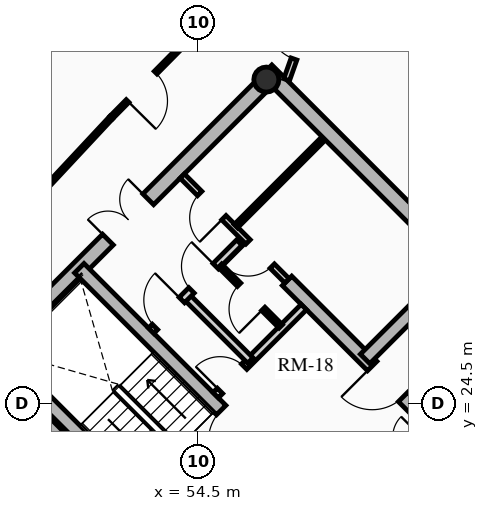
"""IFC4 building model, lengths in metres.
Left out: names, types, materials, properties, quantities, classifications, styles, units other than length and angle.
Written with IfcOpenShell. Run it as: python <this file> out.ifc"""

import sys

from ifc_helpers import new_model, si_unit, direction, frame, frame_2d, origin, origin_2d, place, context, subcontext, project, spatial, rectangle, hollow_circle, extrude, source, transform, mapped, element, fill, save


model = new_model("IFC4")
c1 = context("Model", 3, precision=1e-05, world=origin(), true_north=direction((0.0, 1.0)))
c2 = subcontext(c1, "Body", "Model", "MODEL_VIEW")
j1 = project(units=[si_unit("LENGTHUNIT", "METRE"), si_unit("PLANEANGLEUNIT", "RADIAN")], contexts=[c1])
p1 = place(None, origin())
s1 = spatial("IfcSite", under=j1, at=p1, CompositionType="ELEMENT")
p2 = place(p1, origin())
s2 = spatial("IfcBuilding", under=s1, at=p2, CompositionType="ELEMENT")
p3 = place(p2, frame((0.0, 0.0, 202.48)))
s3 = spatial("IfcBuildingStorey", under=s2, at=p3, CompositionType="ELEMENT", Elevation=202.48)
for number, where, z_axis, x_axis in (
    (1, (58.702, 15.732, 0.0), (0.0, 0.0, 1.0), (-0.707, 0.707, 0.0)),
    (2, (66.268, 23.298, 0.0), (0.0, 0.0, 1.0), (-0.707, 0.707, 0.0)),
):
    element("IfcWall", number, at=place(p3, frame(where, z_axis=z_axis, x_axis=x_axis)), inside=s3, PredefinedType="SHEAR", context=c2, shape_type="SweptSolid", body=[
        extrude(rectangle(XDim=14.1, YDim=0.4, at=frame_2d((7.05, 0.0))), origin(), (0.0, 0.0, 1.0), 2.91),
    ])
p4 = place(p3, frame((48.873, 25.561, 0.0), z_axis=(0.0, 0.0, 1.0), x_axis=(0.707106781187, 0.707106781187, 0.0)))
e3 = element("IfcWall", 3, at=p4, inside=s3, PredefinedType="SHEAR", context=c2, shape_type="SweptSolid", body=[
    extrude(rectangle(XDim=10.7, YDim=0.4, at=frame_2d((5.35, 0.0))), origin(), (0.0, 0.0, 1.0), 2.91),
])
m1 = source(origin(), c2, "Body", "SweptSolid", [
    extrude(rectangle(XDim=1.5, YDim=2.02, at=frame_2d((0.75, 1.01))), frame((0.0, 0.21, 0.0), z_axis=(0.0, -1.0, 0.0), x_axis=(1.0, 0.0, 0.0)), (0.0, 0.0, 1.0), 0.42),
])
p5 = place(p4, frame((4.6, 0.0, 0.0)))
e4 = element("IfcOpeningElement", 4, at=p5, cuts=e3, PredefinedType="OPENING", context=c2, shape_type="MappedRepresentation", body=[
    mapped(m1, transform((0.0, 0.0, 0.0), x_axis=(1.0, 0.0, 0.0), y_axis=(0.0, 1.0, 0.0), z_axis=(0.0, 0.0, 1.0), scale=1.0)),
])
p6 = place(p3, frame((61.06, 18.373, 0.0), z_axis=(0.0, 0.0, 1.0), x_axis=(-0.707106781187, 0.707106781187, 0.0)))
e5 = element("IfcWall", 5, at=p6, inside=s3, PredefinedType="SHEAR", context=c2, shape_type="SweptSolid", body=[
    extrude(rectangle(XDim=13.7, YDim=0.35, at=frame_2d((6.85, 0.0))), origin(), (0.0, 0.0, 1.0), 2.91),
])
m2 = source(origin(), c2, "Body", "SweptSolid", [
    extrude(rectangle(XDim=1.1, YDim=2.015, at=frame_2d((0.55, 1.007))), frame((0.0, 0.185, 0.0), z_axis=(0.0, -1.0, 0.0), x_axis=(1.0, 0.0, 0.0)), (0.0, 0.0, 1.0), 0.37),
])
p7 = place(p6, frame((4.85, 0.0, 0.0)))
e6 = element("IfcOpeningElement", 6, at=p7, cuts=e5, PredefinedType="OPENING", context=c2, shape_type="MappedRepresentation", body=[
    mapped(m2, transform((0.0, 0.0, 0.0), x_axis=(1.0, 0.0, 0.0), y_axis=(0.0, 1.0, 0.0), z_axis=(0.0, 0.0, 1.0), scale=1.0)),
])
p8 = place(p6, frame((0.625, 0.0, 0.0)))
e7 = element("IfcOpeningElement", 7, at=p8, cuts=e5, PredefinedType="OPENING", context=c2, shape_type="MappedRepresentation", body=[
    mapped(m2, transform((0.0, 0.0, 0.0), x_axis=(1.0, 0.0, 0.0), y_axis=(0.0, 1.0, 0.0), z_axis=(0.0, 0.0, 1.0), scale=1.0)),
])
p9 = place(p6, frame((2.625, 0.0, 0.0)))
e8 = element("IfcOpeningElement", 8, at=p9, cuts=e5, PredefinedType="OPENING", context=c2, shape_type="MappedRepresentation", body=[
    mapped(m2, transform((0.0, 0.0, 0.0), x_axis=(1.0, 0.0, 0.0), y_axis=(0.0, 1.0, 0.0), z_axis=(0.0, 0.0, 1.0), scale=1.0)),
])
m3 = source(origin(), c2, "Body", "SweptSolid", [
    extrude(rectangle(XDim=1.15, YDim=2.02, at=frame_2d((0.575, 1.01))), frame((0.0, 0.185, 0.0), z_axis=(0.0, -1.0, 0.0), x_axis=(1.0, 0.0, 0.0)), (0.0, 0.0, 1.0), 0.37),
])
p10 = place(p6, frame((7.27, 0.0, 0.0)))
e9 = element("IfcOpeningElement", 9, at=p10, cuts=e5, PredefinedType="OPENING", context=c2, shape_type="MappedRepresentation", body=[
    mapped(m3, transform((0.0, 0.0, 0.0), x_axis=(1.0, 0.0, 0.0), y_axis=(0.0, 1.0, 0.0), z_axis=(0.0, 0.0, 1.0), scale=1.0)),
])
p11 = place(p3, frame((63.627, 20.94, 0.0), z_axis=(0.0, 0.0, 1.0), x_axis=(-0.707119496762, 0.707094065383, 0.0)))
e10 = element("IfcWall", 10, at=p11, inside=s3, PredefinedType="SHEAR", context=c2, shape_type="SweptSolid", body=[
    extrude(rectangle(XDim=9.6, YDim=0.35, at=frame_2d((4.8, 0.0))), origin(), (0.0, 0.0, 1.0), 2.91),
])
p12 = place(p11, frame((5.28, 0.0, 0.0)))
e11 = element("IfcOpeningElement", 11, at=p12, cuts=e10, PredefinedType="OPENING", context=c2, shape_type="MappedRepresentation", body=[
    mapped(m3, transform((0.0, 0.0, 0.0), x_axis=(1.0, 0.0, 0.0), y_axis=(0.0, 1.0, 0.0), z_axis=(0.0, 0.0, 1.0), scale=1.0)),
])
p13 = place(p3, frame((53.922, 21.141, 0.0), z_axis=(0.0, 0.0, 1.0), x_axis=(-0.707106781187, 0.707106781187, 0.0)))
e12 = element("IfcWall", 12, at=p13, inside=s3, PredefinedType="SHEAR", context=c2, shape_type="SweptSolid", body=[
    extrude(rectangle(XDim=6.695, YDim=0.35, at=frame_2d((3.348, 0.0))), origin(), (0.0, 0.0, 1.0), 2.91),
])
p14 = place(p3, frame((58.893, 25.674, 0.0), z_axis=(0.0, 0.0, 1.0), x_axis=(0.707106781187, 0.707106781187, 0.0)))
e13 = element("IfcWall", 13, at=p14, inside=s3, PredefinedType="SHEAR", context=c2, shape_type="SweptSolid", body=[
    extrude(rectangle(XDim=3.285, YDim=0.35, at=frame_2d((1.643, 0.0))), origin(), (0.0, 0.0, 1.0), 2.91),
])
p15 = place(p3, frame((56.294, 33.024, 0.0), z_axis=(0.0, 0.0, 1.0), x_axis=(0.707106781187, 0.707106781187, 0.0)))
e14 = element("IfcColumn", 14, at=p15, inside=s3, PredefinedType="COLUMN", context=c2, shape_type="SweptSolid", body=[
    extrude(hollow_circle(Radius=0.33, WallThickness=0.025, at=origin_2d()), origin(), (0.0, 0.0, 1.0), 2.91),
])
p16 = place(p3, frame((58.214, 21.467, 0.0), z_axis=(0.0, 0.0, 1.0), x_axis=(0.707106781187, 0.707106781187, 0.0)))
e15 = element("IfcWall", 15, at=p16, inside=s3, PredefinedType="PARTITIONING", context=c2, shape_type="SweptSolid", body=[
    extrude(rectangle(XDim=3.28, YDim=0.2, at=frame_2d((1.64, 0.0))), origin(), (0.0, 0.0, 1.0), 2.685),
])
m4 = source(origin(), c2, "Body", "SweptSolid", [
    extrude(rectangle(XDim=1.5, YDim=2.02, at=frame_2d((0.75, 1.01))), frame((0.0, 0.11, 0.0), z_axis=(0.0, -1.0, 0.0), x_axis=(1.0, 0.0, 0.0)), (0.0, 0.0, 1.0), 0.22),
])
p17 = place(p16, frame((1.55, 0.0, 0.0)))
e16 = element("IfcOpeningElement", 16, at=p17, cuts=e15, PredefinedType="OPENING", context=c2, shape_type="MappedRepresentation", body=[
    mapped(m4, transform((0.0, 0.0, 0.0), x_axis=(1.0, 0.0, 0.0), y_axis=(0.0, 1.0, 0.0), z_axis=(0.0, 0.0, 1.0), scale=1.0)),
])
p18 = place(p3, frame((54.961, 24.719, 0.0), z_axis=(0.0, 0.0, 1.0), x_axis=(0.707106781187, 0.707106781187, 0.0)))
e17 = element("IfcWall", 17, at=p18, inside=s3, PredefinedType="PARTITIONING", context=c2, shape_type="SweptSolid", body=[
    extrude(rectangle(XDim=3.28, YDim=0.2, at=frame_2d((1.64, 0.0))), origin(), (0.0, 0.0, 1.0), 2.685),
])
m5 = source(origin(), c2, "Body", "SweptSolid", [
    extrude(rectangle(XDim=0.9, YDim=2.005, at=frame_2d((0.45, 1.002))), frame((0.0, 0.11, 0.0), z_axis=(0.0, -1.0, 0.0), x_axis=(1.0, 0.0, 0.0)), (0.0, 0.0, 1.0), 0.22),
])
p19 = place(p18, frame((0.16, 0.0, 0.0)))
e18 = element("IfcOpeningElement", 18, at=p19, cuts=e17, PredefinedType="OPENING", context=c2, shape_type="MappedRepresentation", body=[
    mapped(m5, transform((0.0, 0.0, 0.0), x_axis=(1.0, 0.0, 0.0), y_axis=(0.0, 1.0, 0.0), z_axis=(0.0, 0.0, 1.0), scale=1.0)),
])
p20 = place(p3, frame((55.874, 25.631, 0.0), z_axis=(0.0, 0.0, 1.0), x_axis=(-0.707157639372, 0.707055919343, 0.0)))
e19 = element("IfcWall", 19, at=p20, inside=s3, PredefinedType="PARTITIONING", context=c2, shape_type="SweptSolid", body=[
    extrude(rectangle(XDim=2.4, YDim=0.2, at=frame_2d((1.2, 0.0))), origin(), (0.0, 0.0, 1.0), 2.685),
])
p21 = place(p3, frame((53.264, 26.416, 0.0), z_axis=(0.0, 0.0, 1.0), x_axis=(0.707106781187, 0.707106781187, 0.0)))
e20 = element("IfcWall", 20, at=p21, inside=s3, PredefinedType="PARTITIONING", context=c2, shape_type="SweptSolid", body=[
    extrude(rectangle(XDim=3.28, YDim=0.2, at=frame_2d((1.64, 0.0))), origin(), (0.0, 0.0, 1.0), 2.685),
])
m6 = source(origin(), c2, "Body", "SweptSolid", [
    extrude(rectangle(XDim=1.0, YDim=2.015, at=frame_2d((0.5, 1.007))), frame((0.0, 0.11, 0.0), z_axis=(0.0, -1.0, 0.0), x_axis=(1.0, 0.0, 0.0)), (0.0, 0.0, 1.0), 0.22),
])
p22 = place(p21, frame((0.14, 0.0, 0.0)))
e21 = element("IfcOpeningElement", 21, at=p22, cuts=e20, PredefinedType="OPENING", context=c2, shape_type="MappedRepresentation", body=[
    mapped(m6, transform((0.0, 0.0, 0.0), x_axis=(1.0, 0.0, 0.0), y_axis=(0.0, 1.0, 0.0), z_axis=(0.0, 0.0, 1.0), scale=1.0)),
])
p23 = place(p21, frame((1.5, 0.0, 0.0)))
e22 = element("IfcOpeningElement", 22, at=p23, cuts=e20, PredefinedType="OPENING", context=c2, shape_type="MappedRepresentation", body=[
    mapped(m5, transform((0.0, 0.0, 0.0), x_axis=(1.0, 0.0, 0.0), y_axis=(0.0, 1.0, 0.0), z_axis=(0.0, 0.0, 1.0), scale=1.0)),
])
p24 = place(p3, frame((56.673, 26.529, 0.0), z_axis=(0.0, 0.0, 1.0), x_axis=(-0.707052764397, 0.70716079385, 0.0)))
e23 = element("IfcWall", 23, at=p24, inside=s3, PredefinedType="PARTITIONING", context=c2, shape_type="SweptSolid", body=[
    extrude(rectangle(XDim=2.26, YDim=0.125, at=frame_2d((1.13, 0.0))), origin(), (0.0, 0.0, 1.0), 2.685),
])
m7 = source(origin(), c2, "Body", "SweptSolid", [
    extrude(rectangle(XDim=0.9, YDim=2.005, at=frame_2d((0.45, 1.002))), frame((0.0, 0.073, 0.0), z_axis=(0.0, -1.0, 0.0), x_axis=(1.0, 0.0, 0.0)), (0.0, 0.0, 1.0), 0.145),
])
p25 = place(p24, frame((0.65, 0.0, 0.0)))
e24 = element("IfcOpeningElement", 24, at=p25, cuts=e23, PredefinedType="OPENING", context=c2, shape_type="MappedRepresentation", body=[
    mapped(m7, transform((0.0, 0.0, 0.0), x_axis=(1.0, 0.0, 0.0), y_axis=(0.0, 1.0, 0.0), z_axis=(0.0, 0.0, 1.0), scale=1.0)),
])
p26 = place(p3, frame((56.839, 27.728, 0.0), z_axis=(0.0, 0.0, 1.0), x_axis=(-0.707106781187, 0.707106781187, 0.0)))
e25 = element("IfcWall", 25, at=p26, inside=s3, PredefinedType="PARTITIONING", context=c2, shape_type="SweptSolid", body=[
    extrude(rectangle(XDim=3.9, YDim=0.16, at=frame_2d((1.95, 0.0))), origin(), (0.0, 0.0, 1.0), 2.685),
])
m8 = source(origin(), c2, "Body", "SweptSolid", [
    extrude(rectangle(XDim=0.9, YDim=2.005, at=frame_2d((0.45, 1.002))), frame((0.0, 0.09, 0.0), z_axis=(0.0, -1.0, 0.0), x_axis=(1.0, 0.0, 0.0)), (0.0, 0.0, 1.0), 0.18),
])
p27 = place(p26, frame((0.55, 0.0, 0.0)))
e26 = element("IfcOpeningElement", 26, at=p27, cuts=e25, PredefinedType="OPENING", context=c2, shape_type="MappedRepresentation", body=[
    mapped(m8, transform((0.0, 0.0, 0.0), x_axis=(1.0, 0.0, 0.0), y_axis=(0.0, 1.0, 0.0), z_axis=(0.0, 0.0, 1.0), scale=1.0)),
])
p28 = place(p26, frame((2.35, 0.0, 0.0)))
e27 = element("IfcOpeningElement", 27, at=p28, cuts=e25, PredefinedType="OPENING", context=c2, shape_type="MappedRepresentation", body=[
    mapped(m8, transform((0.0, 0.0, 0.0), x_axis=(1.0, 0.0, 0.0), y_axis=(0.0, 1.0, 0.0), z_axis=(0.0, 0.0, 1.0), scale=1.0)),
])
p29 = place(p3, frame((55.492, 29.167, 0.0), z_axis=(0.0, 0.0, 1.0), x_axis=(0.707144688645, 0.707068871696, 0.0)))
e28 = element("IfcWall", 28, at=p29, inside=s3, PredefinedType="PARTITIONING", context=c2, shape_type="SweptSolid", body=[
    extrude(rectangle(XDim=3.22, YDim=0.125, at=frame_2d((1.61, 0.0))), origin(), (0.0, 0.0, 1.0), 2.222),
])
p30 = place(p3, frame((54.506, 34.344, 0.0), z_axis=(0.0, 0.0, 1.0), x_axis=(-0.703053402247, -0.711137056824, 0.0)))
e29 = element("IfcWall", 29, at=p30, inside=s3, PredefinedType="MOVABLE", context=c2, shape_type="SweptSolid", body=[
    extrude(rectangle(XDim=3.262, YDim=0.1, at=frame_2d((1.631, 0.0))), origin(), (0.0, 0.0, 1.0), 2.322),
])
m9 = source(origin(), c2, "Body", "SweptSolid", [
    extrude(rectangle(XDim=1.05, YDim=2.015, at=frame_2d((0.525, 1.007))), frame((0.0, 0.06, 0.0), z_axis=(0.0, -1.0, 0.0), x_axis=(1.0, 0.0, 0.0)), (0.0, 0.0, 1.0), 0.12),
])
p31 = place(p30, frame((1.599, 0.0, 0.0)))
e30 = element("IfcOpeningElement", 30, at=p31, cuts=e29, PredefinedType="OPENING", context=c2, shape_type="MappedRepresentation", body=[
    mapped(m9, transform((0.0, 0.0, 0.0), x_axis=(1.0, 0.0, 0.0), y_axis=(0.0, 1.0, 0.0), z_axis=(0.0, 0.0, 1.0), scale=1.0)),
])
p32 = place(p3, frame((52.212, 32.024, 0.0), z_axis=(0.0, 0.0, 1.0), x_axis=(-0.682158998173, -0.731203871169, 0.0)))
e31 = element("IfcWall", 31, at=p32, inside=s3, PredefinedType="MOVABLE", context=c2, shape_type="SweptSolid", body=[
    extrude(rectangle(XDim=6.282, YDim=0.1, at=frame_2d((3.141, 0.0))), origin(), (0.0, 0.0, 1.0), 2.255),
])
p33 = place(p3, frame((56.828, 33.021, 0.0), z_axis=(0.0, 0.0, 1.0), x_axis=(0.334788446034, 0.942293317605, 0.0)))
e32 = element("IfcWall", 32, at=p33, inside=s3, PredefinedType="PARTITIONING", context=c2, shape_type="SweptSolid", body=[
    extrude(rectangle(XDim=1.829, YDim=0.16, at=frame_2d((0.915, 0.0))), origin(), (0.0, 0.0, 1.0), 2.255),
])
m10 = source(origin(), c2, "Body", "SweptSolid", [
    extrude(rectangle(XDim=1.05, YDim=2.015, at=frame_2d((0.525, 1.007))), frame((0.0, 0.09, 0.0), z_axis=(0.0, -1.0, 0.0), x_axis=(1.0, 0.0, 0.0)), (0.0, 0.0, 1.0), 0.18),
])
p34 = place(p33, frame((0.579, 0.0, 0.0)))
e33 = element("IfcOpeningElement", 33, at=p34, cuts=e32, PredefinedType="OPENING", context=c2, shape_type="MappedRepresentation", body=[
    mapped(m10, transform((0.0, 0.0, 0.0), x_axis=(1.0, 0.0, 0.0), y_axis=(0.0, 1.0, 0.0), z_axis=(0.0, 0.0, 1.0), scale=1.0)),
])
m11 = source(origin(), c2, "Body", "SweptSolid", [
    extrude(rectangle(XDim=1.15, YDim=2.02, at=frame_2d((0.575, 1.01))), frame((0.0, 0.025, 0.0), z_axis=(0.0, -1.0, 0.0), x_axis=(1.0, 0.0, 0.0)), (0.0, 0.0, 1.0), 0.05),
])
p35 = place(p10, origin())
e34 = element("IfcDoor", 34, at=p35, inside=s3, OperationType="SINGLE_SWING_LEFT", PredefinedType="DOOR", context=c2, shape_type="MappedRepresentation", body=[
    mapped(m11, transform((0.0, 0.0, 0.0), x_axis=(1.0, 0.0, 0.0), y_axis=(0.0, 1.0, 0.0), z_axis=(0.0, 0.0, 1.0), scale=1.0)),
])
fill(e9, e34)
p36 = place(p12, origin())
e35 = element("IfcDoor", 35, at=p36, inside=s3, OperationType="SINGLE_SWING_RIGHT", PredefinedType="DOOR", context=c2, shape_type="MappedRepresentation", body=[
    mapped(m11, transform((0.0, 0.0, 0.0), x_axis=(1.0, 0.0, 0.0), y_axis=(0.0, 1.0, 0.0), z_axis=(0.0, 0.0, 1.0), scale=1.0)),
])
fill(e11, e35)
m12 = source(origin(), c2, "Body", "SweptSolid", [
    extrude(rectangle(XDim=1.5, YDim=2.02, at=frame_2d((0.75, 1.01))), frame((0.0, 0.025, 0.0), z_axis=(0.0, -1.0, 0.0), x_axis=(1.0, 0.0, 0.0)), (0.0, 0.0, 1.0), 0.05),
])
p37 = place(p5, origin())
e36 = element("IfcDoor", 36, at=p37, inside=s3, OperationType="DOUBLE_DOOR_SINGLE_SWING", PredefinedType="DOOR", context=c2, shape_type="MappedRepresentation", body=[
    mapped(m12, transform((0.0, 0.0, 0.0), x_axis=(1.0, 0.0, 0.0), y_axis=(0.0, 1.0, 0.0), z_axis=(0.0, 0.0, 1.0), scale=1.0)),
])
fill(e4, e36)
m13 = source(origin(), c2, "Body", "SweptSolid", [
    extrude(rectangle(XDim=0.9, YDim=2.005, at=frame_2d((0.45, 1.002))), frame((0.0, 0.025, 0.0), z_axis=(0.0, -1.0, 0.0), x_axis=(1.0, 0.0, 0.0)), (0.0, 0.0, 1.0), 0.05),
])
p38 = place(p19, origin())
e37 = element("IfcDoor", 37, at=p38, inside=s3, OperationType="SINGLE_SWING_LEFT", PredefinedType="DOOR", context=c2, shape_type="MappedRepresentation", body=[
    mapped(m13, transform((0.0, 0.0, 0.0), x_axis=(1.0, 0.0, 0.0), y_axis=(0.0, 1.0, 0.0), z_axis=(0.0, 0.0, 1.0), scale=1.0)),
])
fill(e18, e37)
m14 = source(origin(), c2, "Body", "SweptSolid", [
    extrude(rectangle(XDim=1.0, YDim=2.015, at=frame_2d((0.5, 1.007))), frame((0.0, 0.025, 0.0), z_axis=(0.0, -1.0, 0.0), x_axis=(1.0, 0.0, 0.0)), (0.0, 0.0, 1.0), 0.05),
])
p39 = place(p22, origin())
e38 = element("IfcDoor", 38, at=p39, inside=s3, OperationType="SINGLE_SWING_RIGHT", PredefinedType="DOOR", context=c2, shape_type="MappedRepresentation", body=[
    mapped(m14, transform((0.0, 0.0, 0.0), x_axis=(1.0, 0.0, 0.0), y_axis=(0.0, 1.0, 0.0), z_axis=(0.0, 0.0, 1.0), scale=1.0)),
])
fill(e21, e38)
p40 = place(p23, origin())
e39 = element("IfcDoor", 39, at=p40, inside=s3, OperationType="SINGLE_SWING_RIGHT", PredefinedType="DOOR", context=c2, shape_type="MappedRepresentation", body=[
    mapped(m13, transform((0.0, 0.0, 0.0), x_axis=(1.0, 0.0, 0.0), y_axis=(0.0, 1.0, 0.0), z_axis=(0.0, 0.0, 1.0), scale=1.0)),
])
fill(e22, e39)
p41 = place(p25, origin())
e40 = element("IfcDoor", 40, at=p41, inside=s3, OperationType="SINGLE_SWING_LEFT", PredefinedType="DOOR", context=c2, shape_type="MappedRepresentation", body=[
    mapped(m13, transform((0.0, 0.0, 0.0), x_axis=(1.0, 0.0, 0.0), y_axis=(0.0, 1.0, 0.0), z_axis=(0.0, 0.0, 1.0), scale=1.0)),
])
fill(e24, e40)
p42 = place(p27, origin())
e41 = element("IfcDoor", 41, at=p42, inside=s3, OperationType="SINGLE_SWING_RIGHT", PredefinedType="DOOR", context=c2, shape_type="MappedRepresentation", body=[
    mapped(m13, transform((0.0, 0.0, 0.0), x_axis=(1.0, 0.0, 0.0), y_axis=(0.0, 1.0, 0.0), z_axis=(0.0, 0.0, 1.0), scale=1.0)),
])
fill(e26, e41)
p43 = place(p28, origin())
e42 = element("IfcDoor", 42, at=p43, inside=s3, OperationType="SINGLE_SWING_LEFT", PredefinedType="DOOR", context=c2, shape_type="MappedRepresentation", body=[
    mapped(m13, transform((0.0, 0.0, 0.0), x_axis=(1.0, 0.0, 0.0), y_axis=(0.0, 1.0, 0.0), z_axis=(0.0, 0.0, 1.0), scale=1.0)),
])
fill(e27, e42)
m15 = source(origin(), c2, "Body", "SweptSolid", [
    extrude(rectangle(XDim=1.05, YDim=2.015, at=frame_2d((0.525, 1.007))), frame((0.0, 0.025, 0.0), z_axis=(0.0, -1.0, 0.0), x_axis=(1.0, 0.0, 0.0)), (0.0, 0.0, 1.0), 0.05),
])
p44 = place(p34, origin())
e43 = element("IfcDoor", 43, at=p44, inside=s3, OperationType="SINGLE_SWING_RIGHT", PredefinedType="DOOR", context=c2, shape_type="MappedRepresentation", body=[
    mapped(m15, transform((0.0, 0.0, 0.0), x_axis=(1.0, 0.0, 0.0), y_axis=(0.0, 1.0, 0.0), z_axis=(0.0, 0.0, 1.0), scale=1.0)),
])
fill(e33, e43)
p45 = place(p31, origin())
e44 = element("IfcDoor", 44, at=p45, inside=s3, OperationType="SINGLE_SWING_RIGHT", PredefinedType="DOOR", context=c2, shape_type="MappedRepresentation", body=[
    mapped(m15, transform((0.0, 0.0, 0.0), x_axis=(1.0, 0.0, 0.0), y_axis=(0.0, 1.0, 0.0), z_axis=(0.0, 0.0, 1.0), scale=1.0)),
])
fill(e30, e44)
save(model, sys.argv[1])
